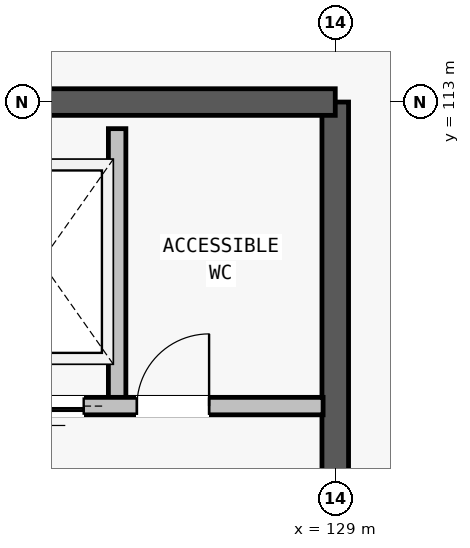
"""IFC4 building model, lengths in metres.
Left out: names, types, materials, properties, quantities, classifications, styles, units other than length and angle.
Written with IfcOpenShell. Run it as: python <this file> out.ifc"""

import sys

from ifc_helpers import new_model, si_unit, direction, frame, frame_2d, origin, place, context, subcontext, project, spatial, rectangle, extrude, element, fill, save


model = new_model("IFC4")
c1 = context("Model", 3, precision=1e-05, world=origin(), true_north=direction((0.0, 1.0)))
c2 = subcontext(c1, "Body", "Model", "MODEL_VIEW")
j1 = project(units=[si_unit("LENGTHUNIT", "METRE"), si_unit("PLANEANGLEUNIT", "RADIAN")], contexts=[c1])
p1 = place(None, origin())
s1 = spatial("IfcSite", under=j1, at=p1, CompositionType="ELEMENT")
p2 = place(p1, origin())
s2 = spatial("IfcBuilding", under=s1, at=p2, CompositionType="ELEMENT")
p3 = place(p2, frame((0.0, 0.0, 5.6)))
s3 = spatial("IfcBuildingStorey", under=s2, at=p3, CompositionType="ELEMENT", Elevation=5.6)
p4 = place(p3, frame((129.0, 104.0, 0.0), z_axis=(0.0, 0.0, 1.0), x_axis=(0.0, 1.0, 0.0)))
e1 = element("IfcWall", 1, at=p4, inside=s3, PredefinedType="SHEAR", context=c2, shape_type="SweptSolid", body=[
    extrude(rectangle(XDim=9.0, YDim=0.35, at=frame_2d((4.5, 0.0))), origin(), (0.0, 0.0, 1.0), 3.62),
])
p5 = place(p4, frame((1.4, 0.0, 0.0)))
e2 = element("IfcOpeningElement", 2, at=p5, cuts=e1, PredefinedType="OPENING", context=c2, shape_type="SweptSolid", body=[
    extrude(rectangle(XDim=1.9, YDim=2.3, at=frame_2d((0.95, 1.15))), frame((0.0, 0.185, 0.0), z_axis=(0.0, -1.0, 0.0), x_axis=(1.0, 0.0, 0.0)), (0.0, 0.0, 1.0), 0.37),
])
p6 = place(p3, frame((129.0, 113.0, 0.0), z_axis=(0.0, 0.0, 1.0), x_axis=(-1.0, 0.0, 0.0)))
e3 = element("IfcWall", 3, at=p6, inside=s3, PredefinedType="SHEAR", context=c2, shape_type="SweptSolid", body=[
    extrude(rectangle(XDim=9.0, YDim=0.35, at=frame_2d((4.5, 0.0))), origin(), (0.0, 0.0, 1.0), 3.62),
])
p7 = place(p3, frame((126.13, 109.0, 0.0), z_axis=(0.0, 0.0, 1.0), x_axis=(0.0, 1.0, 0.0)))
e4 = element("IfcWall", 4, at=p7, inside=s3, PredefinedType="PARTITIONING", context=c2, shape_type="SweptSolid", body=[
    extrude(rectangle(XDim=3.65, YDim=0.23, at=frame_2d((1.825, 0.0))), origin(), (0.0, 0.0, 1.0), 2.48),
])
p8 = place(p3, frame((124.21, 109.0, 0.0), z_axis=(0.0, 0.0, 1.0), x_axis=(1.0, 0.0, 0.0)))
e5 = element("IfcWall", 5, at=p8, inside=s3, PredefinedType="PARTITIONING", context=c2, shape_type="SweptSolid", body=[
    extrude(rectangle(XDim=4.63, YDim=0.23, at=frame_2d((2.315, 0.0))), origin(), (0.0, 0.0, 1.0), 2.48),
])
p9 = place(p8, frame((0.38, 0.0, 0.0)))
e6 = element("IfcOpeningElement", 6, at=p9, cuts=e5, PredefinedType="OPENING", context=c2, shape_type="SweptSolid", body=[
    extrude(rectangle(XDim=1.1, YDim=2.15, at=frame_2d((0.55, 1.075))), frame((0.0, 0.125, 0.0), z_axis=(0.0, -1.0, 0.0), x_axis=(1.0, 0.0, 0.0)), (0.0, 0.0, 1.0), 0.25),
])
p10 = place(p8, frame((2.18, 0.0, 0.0)))
e7 = element("IfcOpeningElement", 7, at=p10, cuts=e5, PredefinedType="OPENING", context=c2, shape_type="SweptSolid", body=[
    extrude(rectangle(XDim=0.95, YDim=2.1, at=frame_2d((0.475, 1.05))), frame((0.0, 0.125, 0.0), z_axis=(0.0, -1.0, 0.0), x_axis=(1.0, 0.0, 0.0)), (0.0, 0.0, 1.0), 0.25),
])
p11 = place(p9, origin())
e8 = element("IfcDoor", 8, at=p11, inside=s3, OperationType="SLIDING_TO_LEFT", PredefinedType="DOOR", context=c2, shape_type="SweptSolid", body=[
    extrude(rectangle(XDim=1.1, YDim=2.15, at=frame_2d((0.55, 1.075))), frame((0.0, 0.025, 0.0), z_axis=(0.0, -1.0, 0.0), x_axis=(1.0, 0.0, 0.0)), (0.0, 0.0, 1.0), 0.05),
])
fill(e6, e8)
p12 = place(p10, origin())
e9 = element("IfcDoor", 9, at=p12, inside=s3, OperationType="SINGLE_SWING_RIGHT", PredefinedType="DOOR", context=c2, shape_type="SweptSolid", body=[
    extrude(rectangle(XDim=0.95, YDim=2.1, at=frame_2d((0.475, 1.05))), frame((0.0, 0.025, 0.0), z_axis=(0.0, -1.0, 0.0), x_axis=(1.0, 0.0, 0.0)), (0.0, 0.0, 1.0), 0.05),
])
fill(e7, e9)
save(model, sys.argv[1])
